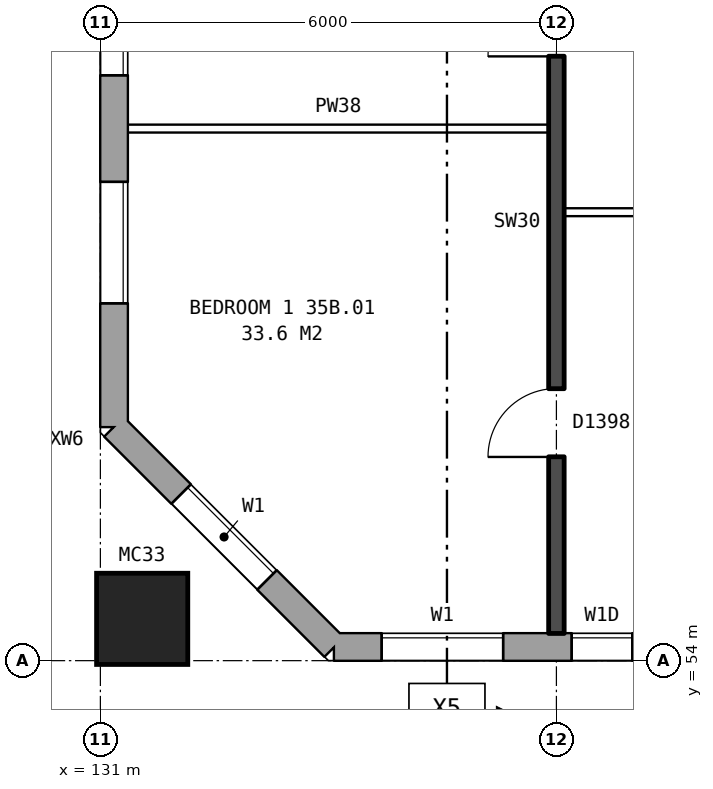
"""IFC4 building model, lengths in metres.
Left out: names, types, materials, properties, quantities, classifications, styles, units other than length and angle.
Written with IfcOpenShell. Run it as: python <this file> out.ifc"""

import sys

from ifc_helpers import new_model, si_unit, direction, frame, frame_2d, origin, origin_2d, place, context, subcontext, project, spatial, rectangle, hollow_rectangle, extrude, element, fill, save


model = new_model("IFC4")
c1 = context("Model", 3, precision=1e-05, world=origin(), true_north=direction((0.0, 1.0)))
c2 = subcontext(c1, "Body", "Model", "MODEL_VIEW")
j1 = project(units=[si_unit("LENGTHUNIT", "METRE"), si_unit("PLANEANGLEUNIT", "RADIAN")], contexts=[c1])
p1 = place(None, origin())
s1 = spatial("IfcSite", under=j1, at=p1, CompositionType="ELEMENT")
p2 = place(p1, origin())
s2 = spatial("IfcBuilding", under=s1, at=p2, CompositionType="ELEMENT")
p3 = place(p2, frame((0.0, 0.0, 126.8)))
s3 = spatial("IfcBuildingStorey", under=s2, at=p3, CompositionType="ELEMENT", Elevation=126.8)
p4 = place(p3, frame((131.55, 54.55, 0.0), z_axis=(0.0, 0.0, 1.0), x_axis=(1.0, 0.0, 0.0)))
e1 = element("IfcColumn", 1, at=p4, inside=s3, PredefinedType="COLUMN", context=c2, shape_type="SweptSolid", body=[
    extrude(hollow_rectangle(XDim=1.2, YDim=1.2, WallThickness=0.065, at=origin_2d()), origin(), (0.0, 0.0, 1.0), 3.1),
])
p5 = place(p3, frame((131.18, 57.075, 0.0), z_axis=(0.0, 0.0, 1.0), x_axis=(0.707106781187, -0.707106781187, 0.0)))
e2 = element("IfcWall", 2, at=p5, inside=s3, PredefinedType="STANDARD", context=c2, shape_type="SweptSolid", body=[
    extrude(rectangle(XDim=4.094, YDim=0.36, at=frame_2d((2.047, 0.0))), origin(), (0.0, 0.0, 1.0), 2.85),
])
p6 = place(p5, frame((1.247, 0.0, 0.8)))
e3 = element("IfcOpeningElement", 3, at=p6, cuts=e2, PredefinedType="OPENING", context=c2, shape_type="SweptSolid", body=[
    extrude(rectangle(XDim=1.6, YDim=1.8, at=frame_2d((0.8, 0.9))), frame((0.0, 0.19, 0.0), z_axis=(0.0, -1.0, 0.0), x_axis=(1.0, 0.0, 0.0)), (0.0, 0.0, 1.0), 0.38),
])
p7 = place(p3, frame((134.075, 54.18, 0.0), z_axis=(0.0, 0.0, 1.0), x_axis=(1.0, 0.0, 0.0)))
e4 = element("IfcWall", 4, at=p7, inside=s3, PredefinedType="STANDARD", context=c2, shape_type="SweptSolid", body=[
    extrude(rectangle(XDim=35.601, YDim=0.36, at=frame_2d((17.8, 0.0))), origin(), (0.0, 0.0, 1.0), 2.85),
])
p8 = place(p7, frame((0.625, 0.0, 0.8)))
e5 = element("IfcOpeningElement", 5, at=p8, cuts=e4, PredefinedType="OPENING", context=c2, shape_type="SweptSolid", body=[
    extrude(rectangle(XDim=1.6, YDim=1.8, at=frame_2d((0.8, 0.9))), frame((0.0, 0.19, 0.0), z_axis=(0.0, -1.0, 0.0), x_axis=(1.0, 0.0, 0.0)), (0.0, 0.0, 1.0), 0.38),
])
p9 = place(p7, frame((3.125, 0.0, 0.8)))
e6 = element("IfcOpeningElement", 6, at=p9, cuts=e4, PredefinedType="OPENING", context=c2, shape_type="SweptSolid", body=[
    extrude(rectangle(XDim=0.8, YDim=1.8, at=frame_2d((0.4, 0.9))), frame((0.0, 0.19, 0.0), z_axis=(0.0, -1.0, 0.0), x_axis=(1.0, 0.0, 0.0)), (0.0, 0.0, 1.0), 0.38),
])
p10 = place(p7, frame((6.625, 0.0, 0.8)))
e7 = element("IfcOpeningElement", 7, at=p10, cuts=e4, PredefinedType="OPENING", context=c2, shape_type="SweptSolid", body=[
    extrude(rectangle(XDim=1.6, YDim=1.8, at=frame_2d((0.8, 0.9))), frame((0.0, 0.19, 0.0), z_axis=(0.0, -1.0, 0.0), x_axis=(1.0, 0.0, 0.0)), (0.0, 0.0, 1.0), 0.38),
])
p11 = place(p7, frame((9.625, 0.0, 0.8)))
e8 = element("IfcOpeningElement", 8, at=p11, cuts=e4, PredefinedType="OPENING", context=c2, shape_type="SweptSolid", body=[
    extrude(rectangle(XDim=1.6, YDim=1.8, at=frame_2d((0.8, 0.9))), frame((0.0, 0.19, 0.0), z_axis=(0.0, -1.0, 0.0), x_axis=(1.0, 0.0, 0.0)), (0.0, 0.0, 1.0), 0.38),
])
p12 = place(p7, frame((12.625, 0.0, 0.8)))
e9 = element("IfcOpeningElement", 9, at=p12, cuts=e4, PredefinedType="OPENING", context=c2, shape_type="SweptSolid", body=[
    extrude(rectangle(XDim=1.6, YDim=1.8, at=frame_2d((0.8, 0.9))), frame((0.0, 0.19, 0.0), z_axis=(0.0, -1.0, 0.0), x_axis=(1.0, 0.0, 0.0)), (0.0, 0.0, 1.0), 0.38),
])
p13 = place(p7, frame((15.625, 0.0, 0.8)))
e10 = element("IfcOpeningElement", 10, at=p13, cuts=e4, PredefinedType="OPENING", context=c2, shape_type="SweptSolid", body=[
    extrude(rectangle(XDim=1.6, YDim=1.8, at=frame_2d((0.8, 0.9))), frame((0.0, 0.19, 0.0), z_axis=(0.0, -1.0, 0.0), x_axis=(1.0, 0.0, 0.0)), (0.0, 0.0, 1.0), 0.38),
])
p14 = place(p7, frame((18.625, 0.0, 0.8)))
e11 = element("IfcOpeningElement", 11, at=p14, cuts=e4, PredefinedType="OPENING", context=c2, shape_type="SweptSolid", body=[
    extrude(rectangle(XDim=1.6, YDim=1.8, at=frame_2d((0.8, 0.9))), frame((0.0, 0.19, 0.0), z_axis=(0.0, -1.0, 0.0), x_axis=(1.0, 0.0, 0.0)), (0.0, 0.0, 1.0), 0.38),
])
p15 = place(p7, frame((21.625, 0.0, 0.8)))
e12 = element("IfcOpeningElement", 12, at=p15, cuts=e4, PredefinedType="OPENING", context=c2, shape_type="SweptSolid", body=[
    extrude(rectangle(XDim=1.6, YDim=1.8, at=frame_2d((0.8, 0.9))), frame((0.0, 0.19, 0.0), z_axis=(0.0, -1.0, 0.0), x_axis=(1.0, 0.0, 0.0)), (0.0, 0.0, 1.0), 0.38),
])
p16 = place(p7, frame((24.625, 0.0, 0.8)))
e13 = element("IfcOpeningElement", 13, at=p16, cuts=e4, PredefinedType="OPENING", context=c2, shape_type="SweptSolid", body=[
    extrude(rectangle(XDim=1.6, YDim=1.8, at=frame_2d((0.8, 0.9))), frame((0.0, 0.19, 0.0), z_axis=(0.0, -1.0, 0.0), x_axis=(1.0, 0.0, 0.0)), (0.0, 0.0, 1.0), 0.38),
])
p17 = place(p7, frame((27.125, 0.0, 0.8)))
e14 = element("IfcOpeningElement", 14, at=p17, cuts=e4, PredefinedType="OPENING", context=c2, shape_type="SweptSolid", body=[
    extrude(rectangle(XDim=1.6, YDim=1.8, at=frame_2d((0.8, 0.9))), frame((0.0, 0.19, 0.0), z_axis=(0.0, -1.0, 0.0), x_axis=(1.0, 0.0, 0.0)), (0.0, 0.0, 1.0), 0.38),
])
p18 = place(p7, frame((29.025, 0.0, 0.8)))
e15 = element("IfcOpeningElement", 15, at=p18, cuts=e4, PredefinedType="OPENING", context=c2, shape_type="SweptSolid", body=[
    extrude(rectangle(XDim=0.6, YDim=0.9, at=frame_2d((0.3, 0.45))), frame((0.0, 0.19, 0.0), z_axis=(0.0, -1.0, 0.0), x_axis=(1.0, 0.0, 0.0)), (0.0, 0.0, 1.0), 0.38),
])
p19 = place(p7, frame((33.625, 0.0, 0.8)))
e16 = element("IfcOpeningElement", 16, at=p19, cuts=e4, PredefinedType="OPENING", context=c2, shape_type="SweptSolid", body=[
    extrude(rectangle(XDim=1.6, YDim=1.8, at=frame_2d((0.8, 0.9))), frame((0.0, 0.19, 0.0), z_axis=(0.0, -1.0, 0.0), x_axis=(1.0, 0.0, 0.0)), (0.0, 0.0, 1.0), 0.38),
])
p20 = place(p7, frame((4.225, 0.0, 1.6)))
e17 = element("IfcOpeningElement", 17, at=p20, cuts=e4, PredefinedType="OPENING", context=c2, shape_type="SweptSolid", body=[
    extrude(rectangle(XDim=0.6, YDim=0.9, at=frame_2d((0.3, 0.45))), frame((0.0, 0.19, 0.0), z_axis=(0.0, -1.0, 0.0), x_axis=(1.0, 0.0, 0.0)), (0.0, 0.0, 1.0), 0.38),
])
p21 = place(p7, frame((30.675, 0.0, 1.7)))
e18 = element("IfcOpeningElement", 18, at=p21, cuts=e4, PredefinedType="OPENING", context=c2, shape_type="SweptSolid", body=[
    extrude(rectangle(XDim=0.6, YDim=0.9, at=frame_2d((0.3, 0.45))), frame((0.0, 0.19, 0.0), z_axis=(0.0, -1.0, 0.0), x_axis=(1.0, 0.0, 0.0)), (0.0, 0.0, 1.0), 0.38),
])
p22 = place(p7, frame((31.575, 0.0, 0.8)))
e19 = element("IfcOpeningElement", 19, at=p22, cuts=e4, PredefinedType="OPENING", context=c2, shape_type="SweptSolid", body=[
    extrude(rectangle(XDim=1.0, YDim=1.8, at=frame_2d((0.5, 0.9))), frame((0.0, 0.19, 0.0), z_axis=(0.0, -1.0, 0.0), x_axis=(1.0, 0.0, 0.0)), (0.0, 0.0, 1.0), 0.38),
])
p23 = place(p3, frame((131.18, 82.925, 0.0), z_axis=(0.0, 0.0, 1.0), x_axis=(0.0, -1.0, 0.0)))
e20 = element("IfcWall", 20, at=p23, inside=s3, PredefinedType="STANDARD", context=c2, shape_type="SweptSolid", body=[
    extrude(rectangle(XDim=25.851, YDim=0.36, at=frame_2d((12.925, 0.0))), origin(), (0.0, 0.0, 1.0), 2.85),
])
p24 = place(p23, frame((1.625, 0.0, 0.8)))
e21 = element("IfcOpeningElement", 21, at=p24, cuts=e20, PredefinedType="OPENING", context=c2, shape_type="SweptSolid", body=[
    extrude(rectangle(XDim=1.6, YDim=1.8, at=frame_2d((0.8, 0.9))), frame((0.0, 0.19, 0.0), z_axis=(0.0, -1.0, 0.0), x_axis=(1.0, 0.0, 0.0)), (0.0, 0.0, 1.0), 0.38),
])
p25 = place(p23, frame((4.625, 0.0, 0.8)))
e22 = element("IfcOpeningElement", 22, at=p25, cuts=e20, PredefinedType="OPENING", context=c2, shape_type="SweptSolid", body=[
    extrude(rectangle(XDim=1.6, YDim=1.8, at=frame_2d((0.8, 0.9))), frame((0.0, 0.19, 0.0), z_axis=(0.0, -1.0, 0.0), x_axis=(1.0, 0.0, 0.0)), (0.0, 0.0, 1.0), 0.38),
])
p26 = place(p23, frame((19.625, 0.0, 0.8)))
e23 = element("IfcOpeningElement", 23, at=p26, cuts=e20, PredefinedType="OPENING", context=c2, shape_type="SweptSolid", body=[
    extrude(rectangle(XDim=1.6, YDim=1.8, at=frame_2d((0.8, 0.9))), frame((0.0, 0.19, 0.0), z_axis=(0.0, -1.0, 0.0), x_axis=(1.0, 0.0, 0.0)), (0.0, 0.0, 1.0), 0.38),
])
p27 = place(p23, frame((22.625, 0.0, 0.8)))
e24 = element("IfcOpeningElement", 24, at=p27, cuts=e20, PredefinedType="OPENING", context=c2, shape_type="SweptSolid", body=[
    extrude(rectangle(XDim=1.6, YDim=1.8, at=frame_2d((0.8, 0.9))), frame((0.0, 0.19, 0.0), z_axis=(0.0, -1.0, 0.0), x_axis=(1.0, 0.0, 0.0)), (0.0, 0.0, 1.0), 0.38),
])
p28 = place(p3, frame((137.1, 59.9, 0.0), z_axis=(0.0, 0.0, 1.0), x_axis=(1.0, 0.0, 0.0)))
e25 = element("IfcWall", 25, at=p28, inside=s3, PredefinedType="PARTITIONING", context=c2, shape_type="SweptSolid", body=[
    extrude(rectangle(XDim=5.8, YDim=0.1, at=frame_2d((2.9, 0.0))), origin(), (0.0, 0.0, 1.0), 2.85),
])
p29 = place(p28, frame((1.3, 0.0, 0.0)))
e26 = element("IfcOpeningElement", 26, at=p29, cuts=e25, PredefinedType="OPENING", context=c2, shape_type="SweptSolid", body=[
    extrude(rectangle(XDim=0.9, YDim=2.1, at=frame_2d((0.45, 1.05))), frame((0.0, 0.06, 0.0), z_axis=(0.0, -1.0, 0.0), x_axis=(1.0, 0.0, 0.0)), (0.0, 0.0, 1.0), 0.12),
])
p30 = place(p28, frame((4.2, 0.0, 0.0)))
e27 = element("IfcOpeningElement", 27, at=p30, cuts=e25, PredefinedType="OPENING", context=c2, shape_type="SweptSolid", body=[
    extrude(rectangle(XDim=0.9, YDim=2.1, at=frame_2d((0.45, 1.05))), frame((0.0, 0.06, 0.0), z_axis=(0.0, -1.0, 0.0), x_axis=(1.0, 0.0, 0.0)), (0.0, 0.0, 1.0), 0.12),
])
p31 = place(p3, frame((131.36, 61.0, 0.0), z_axis=(0.0, 0.0, 1.0), x_axis=(1.0, 0.0, 0.0)))
e28 = element("IfcWall", 28, at=p31, inside=s3, PredefinedType="PARTITIONING", context=c2, shape_type="SweptSolid", body=[
    extrude(rectangle(XDim=5.54, YDim=0.1, at=frame_2d((2.77, 0.0))), origin(), (0.0, 0.0, 1.0), 2.85),
])
p32 = place(p3, frame((137.0, 54.36, 0.0), z_axis=(0.0, 0.0, 1.0), x_axis=(0.0, 1.0, 0.0)))
e29 = element("IfcWall", 29, at=p32, inside=s3, PredefinedType="SOLIDWALL", context=c2, shape_type="SweptSolid", body=[
    extrude(rectangle(XDim=9.44, YDim=0.2, at=frame_2d((4.72, 0.0))), origin(), (0.0, 0.0, 1.0), 2.85),
])
p33 = place(p32, frame((2.32, 0.0, 0.0)))
e30 = element("IfcOpeningElement", 30, at=p33, cuts=e29, PredefinedType="OPENING", context=c2, shape_type="SweptSolid", body=[
    extrude(rectangle(XDim=0.9, YDim=2.1, at=frame_2d((0.45, 1.05))), frame((0.0, 0.11, 0.0), z_axis=(0.0, -1.0, 0.0), x_axis=(1.0, 0.0, 0.0)), (0.0, 0.0, 1.0), 0.22),
])
p34 = place(p32, frame((7.59, 0.0, 0.0)))
e31 = element("IfcOpeningElement", 31, at=p34, cuts=e29, PredefinedType="OPENING", context=c2, shape_type="SweptSolid", body=[
    extrude(rectangle(XDim=0.9, YDim=2.1, at=frame_2d((0.45, 1.05))), frame((0.0, 0.11, 0.0), z_axis=(0.0, -1.0, 0.0), x_axis=(1.0, 0.0, 0.0)), (0.0, 0.0, 1.0), 0.22),
])
p35 = place(p6, origin())
e32 = element("IfcWindow", 32, at=p35, inside=s3, PartitioningType="SINGLE_PANEL", PredefinedType="WINDOW", context=c2, shape_type="SweptSolid", body=[
    extrude(rectangle(XDim=1.6, YDim=1.8, at=frame_2d((0.8, 0.9))), frame((0.0, 0.15, 0.0), z_axis=(0.0, -1.0, 0.0), x_axis=(1.0, 0.0, 0.0)), (0.0, 0.0, 1.0), 0.06),
])
fill(e3, e32)
p36 = place(p8, origin())
e33 = element("IfcWindow", 33, at=p36, inside=s3, PartitioningType="SINGLE_PANEL", PredefinedType="WINDOW", context=c2, shape_type="SweptSolid", body=[
    extrude(rectangle(XDim=1.6, YDim=1.8, at=frame_2d((0.8, 0.9))), frame((0.0, 0.15, 0.0), z_axis=(0.0, -1.0, 0.0), x_axis=(1.0, 0.0, 0.0)), (0.0, 0.0, 1.0), 0.06),
])
fill(e5, e33)
p37 = place(p9, origin())
e34 = element("IfcWindow", 34, at=p37, inside=s3, PartitioningType="SINGLE_PANEL", PredefinedType="WINDOW", context=c2, shape_type="SweptSolid", body=[
    extrude(rectangle(XDim=0.8, YDim=1.8, at=frame_2d((0.4, 0.9))), frame((0.0, 0.15, 0.0), z_axis=(0.0, -1.0, 0.0), x_axis=(1.0, 0.0, 0.0)), (0.0, 0.0, 1.0), 0.06),
])
fill(e6, e34)
p38 = place(p26, origin())
e35 = element("IfcWindow", 35, at=p38, inside=s3, PartitioningType="SINGLE_PANEL", PredefinedType="WINDOW", context=c2, shape_type="SweptSolid", body=[
    extrude(rectangle(XDim=1.6, YDim=1.8, at=frame_2d((0.8, 0.9))), frame((0.0, 0.15, 0.0), z_axis=(0.0, -1.0, 0.0), x_axis=(1.0, 0.0, 0.0)), (0.0, 0.0, 1.0), 0.06),
])
fill(e23, e35)
p39 = place(p27, origin())
e36 = element("IfcWindow", 36, at=p39, inside=s3, PartitioningType="SINGLE_PANEL", PredefinedType="WINDOW", context=c2, shape_type="SweptSolid", body=[
    extrude(rectangle(XDim=1.6, YDim=1.8, at=frame_2d((0.8, 0.9))), frame((0.0, 0.15, 0.0), z_axis=(0.0, -1.0, 0.0), x_axis=(1.0, 0.0, 0.0)), (0.0, 0.0, 1.0), 0.06),
])
fill(e24, e36)
p40 = place(p33, origin())
e37 = element("IfcDoor", 37, at=p40, inside=s3, OperationType="SINGLE_SWING_LEFT", PredefinedType="DOOR", context=c2, shape_type="SweptSolid", body=[
    extrude(rectangle(XDim=0.9, YDim=2.1, at=frame_2d((0.45, 1.05))), frame((0.0, 0.025, 0.0), z_axis=(0.0, -1.0, 0.0), x_axis=(1.0, 0.0, 0.0)), (0.0, 0.0, 1.0), 0.05),
])
fill(e30, e37)
p41 = place(p34, origin())
e38 = element("IfcDoor", 38, at=p41, inside=s3, OperationType="SINGLE_SWING_LEFT", PredefinedType="DOOR", context=c2, shape_type="SweptSolid", body=[
    extrude(rectangle(XDim=0.9, YDim=2.1, at=frame_2d((0.45, 1.05))), frame((0.0, 0.025, 0.0), z_axis=(0.0, -1.0, 0.0), x_axis=(1.0, 0.0, 0.0)), (0.0, 0.0, 1.0), 0.05),
])
fill(e31, e38)
save(model, sys.argv[1])
